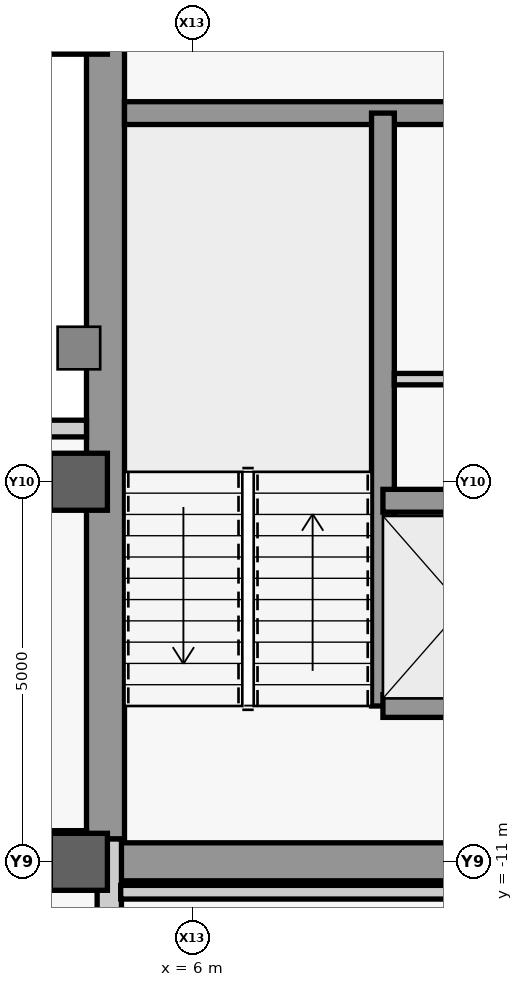
"""IFC4 building model, lengths in metres.
Left out: names, types, materials, properties, quantities, classifications, styles, units other than length and angle.
Written with IfcOpenShell. Run it as: python <this file> out.ifc"""

import sys

from ifc_helpers import new_model, si_unit, direction, frame, frame_2d, origin, origin_2d, place, context, subcontext, project, spatial, rectangle, extrude, source, transform, mapped, element, save


model = new_model("IFC4")
c1 = context("Model", 3, precision=1e-05, world=origin(), true_north=direction((0.0, 1.0)))
c2 = subcontext(c1, "Body", "Model", "MODEL_VIEW")
j1 = project(units=[si_unit("LENGTHUNIT", "METRE"), si_unit("PLANEANGLEUNIT", "RADIAN")], contexts=[c1])
p1 = place(None, origin())
s1 = spatial("IfcSite", under=j1, at=p1, CompositionType="ELEMENT")
p2 = place(p1, origin())
s2 = spatial("IfcBuilding", under=s1, at=p2, CompositionType="ELEMENT")
p3 = place(p2, frame((0.0, 0.0, 354.3)))
s3 = spatial("IfcBuildingStorey", under=s2, at=p3, CompositionType="ELEMENT", Elevation=354.3)
m1 = source(origin(), c2, "Body", "SweptSolid", [
    extrude(rectangle(XDim=21.4, YDim=0.5, at=frame_2d((10.7, 0.0))), origin(), (0.0, 0.0, 1.0), 3.74),
])
p4 = place(p3, frame((4.85, -10.7, 0.0), z_axis=(0.0, 0.0, 1.0), x_axis=(0.0, 1.0, 0.0)))
e1 = element("IfcWall", 1, at=p4, inside=s3, PredefinedType="SHEAR", context=c2, shape_type="MappedRepresentation", body=[
    mapped(m1, transform((0.0, 0.0, 0.0), scale=1.0)),
])
m2 = source(origin(), c2, "Body", "SweptSolid", [
    extrude(rectangle(XDim=5.9, YDim=0.5, at=frame_2d((2.95, 0.0))), origin(), (0.0, 0.0, 1.0), 3.74),
])
p5 = place(p3, frame((4.85, -11.0, 0.0), z_axis=(0.0, 0.0, 1.0), x_axis=(1.0, 0.0, 0.0)))
e2 = element("IfcWall", 2, at=p5, inside=s3, PredefinedType="SHEAR", context=c2, shape_type="MappedRepresentation", body=[
    mapped(m2, transform((0.0, 0.0, 0.0), scale=1.0)),
])
m3 = source(origin(), c2, "Body", "SweptSolid", [
    extrude(rectangle(XDim=5.65, YDim=0.3, at=frame_2d((2.825, 0.0))), origin(), (0.0, 0.0, 1.0), 3.74),
])
p6 = place(p3, frame((5.1, -1.15, 0.0), z_axis=(0.0, 0.0, 1.0), x_axis=(1.0, 0.0, 0.0)))
e3 = element("IfcWall", 3, at=p6, inside=s3, PredefinedType="SHEAR", context=c2, shape_type="MappedRepresentation", body=[
    mapped(m3, transform((0.0, 0.0, 0.0), scale=1.0)),
])
m4 = source(origin(), c2, "Body", "SweptSolid", [
    extrude(rectangle(XDim=0.75, YDim=0.75, at=origin_2d()), origin(), (0.0, 0.0, 1.0), 4.0),
])
for number, where, z_axis, x_axis in (
    (4, (4.5, -11.0, 0.0), (0.0, 0.0, 1.0), (1.0, 0.0, 0.0)),
    (5, (4.5, -6.0, 0.0), (0.0, 0.0, 1.0), (1.0, 0.0, 0.0)),
    (6, (4.5, 0.0, 0.0), (0.0, 0.0, 1.0), (1.0, 0.0, 0.0)),
):
    element("IfcColumn", number, at=place(p3, frame(where, z_axis=z_axis, x_axis=x_axis)), inside=s3, PredefinedType="COLUMN", context=c2, shape_type="MappedRepresentation", body=[
        mapped(m4, transform((0.0, 0.0, 0.0), scale=1.0)),
    ])
m5 = source(origin(), c2, "Body", "SweptSolid", [
    extrude(rectangle(XDim=14.98, YDim=0.32, at=frame_2d((7.49, 0.0))), origin(), (0.0, 0.0, 1.0), 3.045),
])
p7 = place(p3, frame((4.9, -25.68, 0.0), z_axis=(0.0, 0.0, 1.0), x_axis=(0.0, 1.0, 0.0)))
e7 = element("IfcWall", 7, at=p7, inside=s3, PredefinedType="STANDARD", context=c2, shape_type="MappedRepresentation", body=[
    mapped(m5, transform((0.0, 0.0, 0.0), scale=1.0)),
])
m6 = source(origin(), c2, "Body", "SweptSolid", [
    extrude(rectangle(XDim=7.8, YDim=0.3, at=frame_2d((3.9, 0.0))), origin(), (0.0, 0.0, 1.0), 3.74),
])
p8 = place(p3, frame((8.5, -8.95, 0.0), z_axis=(0.0, 0.0, 1.0), x_axis=(0.0, 1.0, 0.0)))
e8 = element("IfcWall", 8, at=p8, inside=s3, PredefinedType="SHEAR", context=c2, shape_type="MappedRepresentation", body=[
    mapped(m6, transform((0.0, 0.0, 0.0), scale=1.0)),
])
m7 = source(origin(), c2, "Body", "SweptSolid", [
    extrude(rectangle(XDim=2.2, YDim=0.3, at=frame_2d((1.1, 0.0))), origin(), (0.0, 0.0, 1.0), 3.74),
])
for number, where, z_axis, x_axis in (
    (9, (8.5, -8.95, 0.0), (0.0, 0.0, 1.0), (1.0, 0.0, 0.0)),
    (10, (8.5, -6.25, 0.0), (0.0, 0.0, 1.0), (1.0, 0.0, 0.0)),
):
    element("IfcWall", number, at=place(p3, frame(where, z_axis=z_axis, x_axis=x_axis)), inside=s3, PredefinedType="SHEAR", context=c2, shape_type="MappedRepresentation", body=[
        mapped(m7, transform((0.0, 0.0, 0.0), scale=1.0)),
    ])
m8 = source(origin(), c2, "Body", "SweptSolid", [
    extrude(rectangle(XDim=2.05, YDim=0.15, at=frame_2d((1.025, 0.0))), origin(), (0.0, 0.0, 1.0), 3.74),
])
p9 = place(p3, frame((8.65, -4.65, 0.0), z_axis=(0.0, 0.0, 1.0), x_axis=(1.0, 0.0, 0.0)))
e11 = element("IfcWall", 11, at=p9, inside=s3, PredefinedType="PARTITIONING", context=c2, shape_type="MappedRepresentation", body=[
    mapped(m8, transform((0.0, 0.0, 0.0), scale=1.0)),
])
m9 = source(origin(), c2, "Body", "SweptSolid", [
    extrude(rectangle(XDim=9.2, YDim=0.22, at=frame_2d((4.6, 0.0))), origin(), (0.0, 0.0, 1.0), 2.79),
])
p10 = place(p3, frame((-4.6, -10.7, 0.0), z_axis=(0.0, 0.0, 1.0), x_axis=(1.0, 0.0, 0.0)))
e12 = element("IfcWall", 12, at=p10, inside=s3, PredefinedType="PARTITIONING", context=c2, shape_type="MappedRepresentation", body=[
    mapped(m9, transform((0.0, 0.0, 0.0), scale=1.0)),
])
m10 = source(origin(), c2, "Body", "SweptSolid", [
    extrude(rectangle(XDim=0.95, YDim=2.15, at=frame_2d((0.475, 1.075))), frame((0.0, 0.12, 0.0), z_axis=(0.0, -1.0, 0.0), x_axis=(1.0, 0.0, 0.0)), (0.0, 0.0, 1.0), 0.24),
])
p11 = place(p10, frame((1.075, 0.0, 0.0)))
e13 = element("IfcOpeningElement", 13, at=p11, cuts=e12, PredefinedType="OPENING", context=c2, shape_type="MappedRepresentation", body=[
    mapped(m10, transform((0.0, 0.0, 0.0), scale=1.0)),
])
p12 = place(p10, frame((5.675, 0.0, 0.0)))
e14 = element("IfcOpeningElement", 14, at=p12, cuts=e12, PredefinedType="OPENING", context=c2, shape_type="MappedRepresentation", body=[
    mapped(m10, transform((0.0, 0.0, 0.0), scale=1.0)),
])
m11 = source(origin(), c2, "Body", "SweptSolid", [
    extrude(rectangle(XDim=9.2, YDim=0.22, at=frame_2d((4.6, 0.0))), origin(), (0.0, 0.0, 1.0), 3.74),
])
p13 = place(p3, frame((-4.6, -5.3, 0.0), z_axis=(0.0, 0.0, 1.0), x_axis=(1.0, 0.0, 0.0)))
e15 = element("IfcWall", 15, at=p13, inside=s3, PredefinedType="PARTITIONING", context=c2, shape_type="MappedRepresentation", body=[
    mapped(m11, transform((0.0, 0.0, 0.0), scale=1.0)),
])
m12 = source(origin(), c2, "Body", "SweptSolid", [
    extrude(rectangle(XDim=12.7, YDim=0.18, at=frame_2d((6.35, 0.0))), origin(), (0.0, 0.0, 1.0), 2.79),
])
p14 = place(p3, frame((5.05, -11.4, 0.0), z_axis=(0.0, 0.0, 1.0), x_axis=(1.0, 0.0, 0.0)))
e16 = element("IfcWall", 16, at=p14, inside=s3, PredefinedType="PARTITIONING", context=c2, shape_type="MappedRepresentation", body=[
    mapped(m12, transform((0.0, 0.0, 0.0), scale=1.0)),
])
m13 = source(origin(), c2, "Body", "SweptSolid", [
    extrude(rectangle(XDim=1.05, YDim=2.2, at=frame_2d((0.525, 1.1))), frame((0.0, 0.1, 0.0), z_axis=(0.0, -1.0, 0.0), x_axis=(1.0, 0.0, 0.0)), (0.0, 0.0, 1.0), 0.2),
])
p15 = place(p14, frame((10.975, 0.0, 0.0)))
e17 = element("IfcOpeningElement", 17, at=p15, cuts=e16, PredefinedType="OPENING", context=c2, shape_type="MappedRepresentation", body=[
    mapped(m13, transform((0.0, 0.0, 0.0), scale=1.0)),
])
save(model, sys.argv[1])
